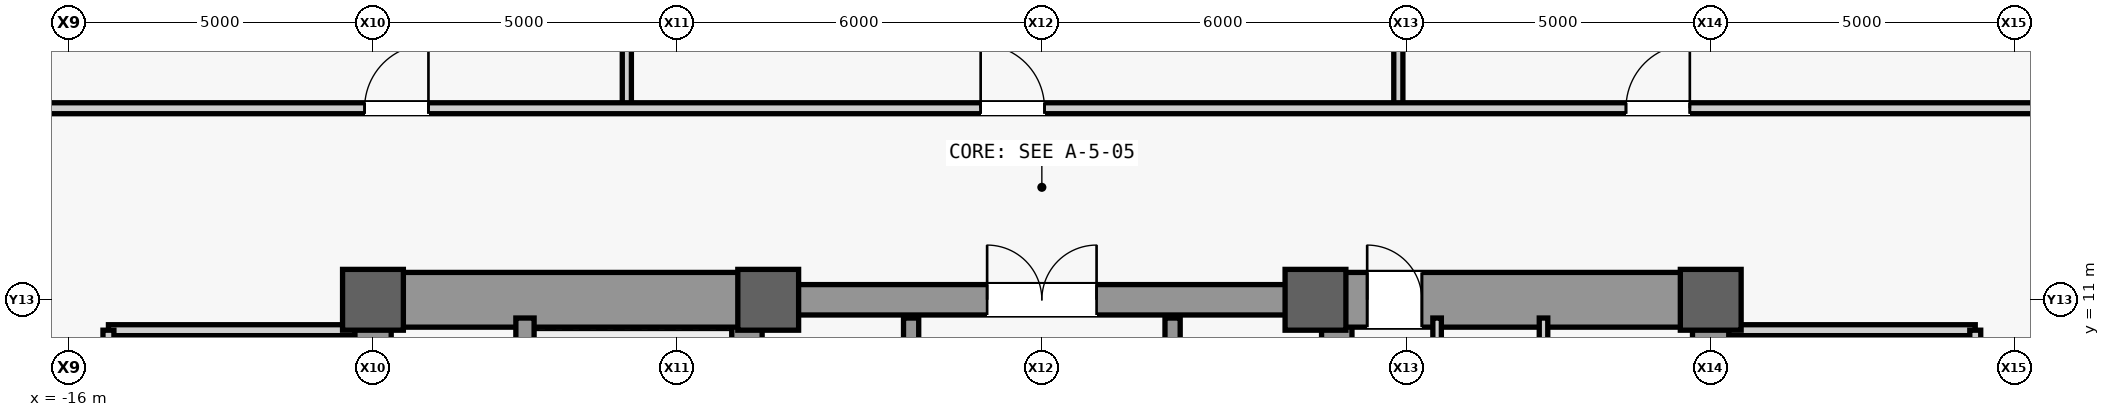
"""IFC4 building model, lengths in metres.
Left out: names, types, materials, properties, quantities, classifications, styles, units other than length and angle.
Written with IfcOpenShell. Run it as: python <this file> out.ifc"""

import sys

from ifc_helpers import new_model, si_unit, direction, frame, frame_2d, origin, origin_2d, place, context, subcontext, project, spatial, rectangle, extrude, source, transform, mapped, element, fill, save


model = new_model("IFC4")
c1 = context("Model", 3, precision=1e-05, world=origin(), true_north=direction((0.0, 1.0)))
c2 = subcontext(c1, "Body", "Model", "MODEL_VIEW")
j1 = project(units=[si_unit("LENGTHUNIT", "METRE"), si_unit("PLANEANGLEUNIT", "RADIAN")], contexts=[c1])
p1 = place(None, origin())
s1 = spatial("IfcSite", under=j1, at=p1, CompositionType="ELEMENT")
p2 = place(p1, origin())
s2 = spatial("IfcBuilding", under=s1, at=p2, CompositionType="ELEMENT")
p3 = place(p2, frame((0.0, 0.0, 70.4)))
s3 = spatial("IfcBuildingStorey", under=s2, at=p3, CompositionType="ELEMENT", Elevation=70.4)
m1 = source(origin(), c2, "Body", "SweptSolid", [
    extrude(rectangle(XDim=22.0, YDim=0.6, at=frame_2d((11.0, 0.0))), origin(), (0.0, 0.0, 1.0), 3.94),
])
p4 = place(p3, frame((-11.0, -11.0, 0.0), z_axis=(0.0, 0.0, 1.0), x_axis=(0.0, 1.0, 0.0)))
e1 = element("IfcWall", 1, at=p4, inside=s3, PredefinedType="SHEAR", context=c2, shape_type="MappedRepresentation", body=[
    mapped(m1, transform((0.0, 0.0, 0.0), scale=1.0)),
])
m2 = source(origin(), c2, "Body", "SweptSolid", [
    extrude(rectangle(XDim=1.1, YDim=2.2, at=frame_2d((0.55, 1.1))), frame((0.0, 0.31, 0.0), z_axis=(0.0, -1.0, 0.0), x_axis=(1.0, 0.0, 0.0)), (0.0, 0.0, 1.0), 0.62),
])
p5 = place(p4, frame((0.8, 0.0, 0.0)))
e2 = element("IfcOpeningElement", 2, at=p5, cuts=e1, PredefinedType="OPENING", context=c2, shape_type="MappedRepresentation", body=[
    mapped(m2, transform((0.0, 0.0, 0.0), scale=1.0)),
])
p6 = place(p4, frame((12.5, 0.0, 0.0)))
e3 = element("IfcOpeningElement", 3, at=p6, cuts=e1, PredefinedType="OPENING", context=c2, shape_type="MappedRepresentation", body=[
    mapped(m2, transform((0.0, 0.0, 0.0), scale=1.0)),
])
m3 = source(origin(), c2, "Body", "SweptSolid", [
    extrude(rectangle(XDim=0.9, YDim=2.15, at=frame_2d((0.45, 1.075))), frame((0.0, 0.31, 0.0), z_axis=(0.0, -1.0, 0.0), x_axis=(1.0, 0.0, 0.0)), (0.0, 0.0, 1.0), 0.62),
])
p7 = place(p4, frame((7.575, 0.0, 0.0)))
e4 = element("IfcOpeningElement", 4, at=p7, cuts=e1, PredefinedType="OPENING", context=c2, shape_type="MappedRepresentation", body=[
    mapped(m3, transform((0.0, 0.0, 0.0), scale=1.0)),
])
m4 = source(origin(), c2, "Body", "SweptSolid", [
    extrude(rectangle(XDim=1.3, YDim=2.3, at=frame_2d((0.65, 1.15))), frame((0.0, 0.31, 0.0), z_axis=(0.0, -1.0, 0.0), x_axis=(1.0, 0.0, 0.0)), (0.0, 0.0, 1.0), 0.62),
])
p8 = place(p4, frame((2.7, 0.0, 0.0)))
e5 = element("IfcOpeningElement", 5, at=p8, cuts=e1, PredefinedType="OPENING", context=c2, shape_type="MappedRepresentation", body=[
    mapped(m4, transform((0.0, 0.0, 0.0), scale=1.0)),
])
p9 = place(p3, frame((11.0, -11.0, 0.0), z_axis=(0.0, 0.0, 1.0), x_axis=(0.0, 1.0, 0.0)))
e6 = element("IfcWall", 6, at=p9, inside=s3, PredefinedType="SHEAR", context=c2, shape_type="MappedRepresentation", body=[
    mapped(m1, transform((0.0, 0.0, 0.0), scale=1.0)),
])
p10 = place(p9, frame((0.8, 0.0, 0.0)))
e7 = element("IfcOpeningElement", 7, at=p10, cuts=e6, PredefinedType="OPENING", context=c2, shape_type="MappedRepresentation", body=[
    mapped(m2, transform((0.0, 0.0, 0.0), scale=1.0)),
])
p11 = place(p9, frame((7.575, 0.0, 0.0)))
e8 = element("IfcOpeningElement", 8, at=p11, cuts=e6, PredefinedType="OPENING", context=c2, shape_type="MappedRepresentation", body=[
    mapped(m3, transform((0.0, 0.0, 0.0), scale=1.0)),
])
p12 = place(p9, frame((2.7, 0.0, 0.0)))
e9 = element("IfcOpeningElement", 9, at=p12, cuts=e6, PredefinedType="OPENING", context=c2, shape_type="MappedRepresentation", body=[
    mapped(m4, transform((0.0, 0.0, 0.0), scale=1.0)),
])
p13 = place(p9, frame((13.35, 0.0, 0.0)))
e10 = element("IfcOpeningElement", 10, at=p13, cuts=e6, PredefinedType="OPENING", context=c2, shape_type="MappedRepresentation", body=[
    mapped(m4, transform((0.0, 0.0, 0.0), scale=1.0)),
])
m5 = source(origin(), c2, "Body", "SweptSolid", [
    extrude(rectangle(XDim=21.4, YDim=0.5, at=frame_2d((10.7, 0.0))), origin(), (0.0, 0.0, 1.0), 3.94),
])
for number, where, z_axis, x_axis in (
    (11, (-4.85, -10.7, 0.0), (0.0, 0.0, 1.0), (0.0, 1.0, 0.0)),
    (12, (4.85, -10.7, 0.0), (0.0, 0.0, 1.0), (0.0, 1.0, 0.0)),
):
    element("IfcWall", number, at=place(p3, frame(where, z_axis=z_axis, x_axis=x_axis)), inside=s3, PredefinedType="SHEAR", context=c2, shape_type="MappedRepresentation", body=[
        mapped(m5, transform((0.0, 0.0, 0.0), scale=1.0)),
    ])
m6 = source(origin(), c2, "Body", "SweptSolid", [
    extrude(rectangle(XDim=5.85, YDim=0.9, at=frame_2d((2.925, 0.0))), origin(), (0.0, 0.0, 1.0), 3.94),
])
p14 = place(p3, frame((-10.7, 11.0, 0.0), z_axis=(0.0, 0.0, 1.0), x_axis=(1.0, 0.0, 0.0)))
e13 = element("IfcWall", 13, at=p14, inside=s3, PredefinedType="SHEAR", context=c2, shape_type="MappedRepresentation", body=[
    mapped(m6, transform((0.0, 0.0, 0.0), scale=1.0)),
])
p15 = place(p3, frame((4.85, 11.0, 0.0), z_axis=(0.0, 0.0, 1.0), x_axis=(1.0, 0.0, 0.0)))
e14 = element("IfcWall", 14, at=p15, inside=s3, PredefinedType="SHEAR", context=c2, shape_type="MappedRepresentation", body=[
    mapped(m6, transform((0.0, 0.0, 0.0), scale=1.0)),
])
m7 = source(origin(), c2, "Body", "SweptSolid", [
    extrude(rectangle(XDim=0.9, YDim=2.15, at=frame_2d((0.45, 1.075))), frame((0.0, 0.46, 0.0), z_axis=(0.0, -1.0, 0.0), x_axis=(1.0, 0.0, 0.0)), (0.0, 0.0, 1.0), 0.92),
])
p16 = place(p15, frame((0.5, 0.0, 0.0)))
e15 = element("IfcOpeningElement", 15, at=p16, cuts=e14, PredefinedType="OPENING", context=c2, shape_type="MappedRepresentation", body=[
    mapped(m7, transform((0.0, 0.0, 0.0), scale=1.0)),
])
m8 = source(origin(), c2, "Body", "SweptSolid", [
    extrude(rectangle(XDim=9.2, YDim=0.5, at=frame_2d((4.6, 0.0))), origin(), (0.0, 0.0, 1.0), 3.94),
])
p17 = place(p3, frame((-4.6, 11.0, 0.0), z_axis=(0.0, 0.0, 1.0), x_axis=(1.0, 0.0, 0.0)))
e16 = element("IfcWall", 16, at=p17, inside=s3, PredefinedType="SHEAR", context=c2, shape_type="MappedRepresentation", body=[
    mapped(m8, transform((0.0, 0.0, 0.0), scale=1.0)),
])
m9 = source(origin(), c2, "Body", "SweptSolid", [
    extrude(rectangle(XDim=1.8, YDim=2.25, at=frame_2d((0.9, 1.125))), frame((0.0, 0.26, 0.0), z_axis=(0.0, -1.0, 0.0), x_axis=(1.0, 0.0, 0.0)), (0.0, 0.0, 1.0), 0.52),
])
p18 = place(p17, frame((3.7, 0.0, 0.0)))
e17 = element("IfcOpeningElement", 17, at=p18, cuts=e16, PredefinedType="OPENING", context=c2, shape_type="MappedRepresentation", body=[
    mapped(m9, transform((0.0, 0.0, 0.0), scale=1.0)),
])
m10 = source(origin(), c2, "Body", "SweptSolid", [
    extrude(rectangle(XDim=1.0, YDim=1.0, at=origin_2d()), origin(), (0.0, 0.0, 1.0), 4.2),
])
for number, where, z_axis, x_axis in (
    (18, (-11.0, 11.0, 0.0), (0.0, 0.0, 1.0), (1.0, 0.0, 0.0)),
    (19, (-4.5, 11.0, 0.0), (0.0, 0.0, 1.0), (1.0, 0.0, 0.0)),
    (20, (4.5, 11.0, 0.0), (0.0, 0.0, 1.0), (1.0, 0.0, 0.0)),
    (21, (11.0, 11.0, 0.0), (0.0, 0.0, 1.0), (1.0, 0.0, 0.0)),
):
    element("IfcColumn", number, at=place(p3, frame(where, z_axis=z_axis, x_axis=x_axis)), inside=s3, PredefinedType="COLUMN", context=c2, shape_type="MappedRepresentation", body=[
        mapped(m10, transform((0.0, 0.0, 0.0), scale=1.0)),
    ])
m11 = source(origin(), c2, "Body", "SweptSolid", [
    extrude(rectangle(XDim=7.75, YDim=0.3, at=frame_2d((3.875, 0.0))), origin(), (0.0, 0.0, 1.0), 3.94),
])
p19 = place(p3, frame((-8.5, 2.95, 0.0), z_axis=(0.0, 0.0, 1.0), x_axis=(0.0, 1.0, 0.0)))
e22 = element("IfcWall", 22, at=p19, inside=s3, PredefinedType="SHEAR", context=c2, shape_type="MappedRepresentation", body=[
    mapped(m11, transform((0.0, 0.0, 0.0), scale=1.0)),
])
m12 = source(origin(), c2, "Body", "SweptSolid", [
    extrude(rectangle(XDim=9.4, YDim=0.14, at=frame_2d((4.7, 0.0))), origin(), (0.0, 0.0, 1.0), 3.94),
])
p20 = place(p3, frame((8.25, 1.3, 0.0), z_axis=(0.0, 0.0, 1.0), x_axis=(0.0, 1.0, 0.0)))
e23 = element("IfcWall", 23, at=p20, inside=s3, PredefinedType="PARTITIONING", context=c2, shape_type="MappedRepresentation", body=[
    mapped(m12, transform((0.0, 0.0, 0.0), scale=1.0)),
])
m13 = source(origin(), c2, "Body", "SweptSolid", [
    extrude(rectangle(XDim=5.7, YDim=0.14, at=frame_2d((2.85, 0.0))), origin(), (0.0, 0.0, 1.0), 3.94),
])
p21 = place(p3, frame((6.5, 5.0, 0.0), z_axis=(0.0, 0.0, 1.0), x_axis=(0.0, 1.0, 0.0)))
e24 = element("IfcWall", 24, at=p21, inside=s3, PredefinedType="PARTITIONING", context=c2, shape_type="MappedRepresentation", body=[
    mapped(m13, transform((0.0, 0.0, 0.0), scale=1.0)),
])
m14 = source(origin(), c2, "Body", "SweptSolid", [
    extrude(rectangle(XDim=0.9, YDim=2.15, at=frame_2d((0.45, 1.075))), frame((0.0, 0.08, 0.0), z_axis=(0.0, -1.0, 0.0), x_axis=(1.0, 0.0, 0.0)), (0.0, 0.0, 1.0), 0.16),
])
p22 = place(p21, frame((2.05, 0.0, 0.0)))
e25 = element("IfcOpeningElement", 25, at=p22, cuts=e24, PredefinedType="OPENING", context=c2, shape_type="MappedRepresentation", body=[
    mapped(m14, transform((0.0, 0.0, 0.0), scale=1.0)),
])
m15 = source(origin(), c2, "Body", "SweptSolid", [
    extrude(rectangle(XDim=4.05, YDim=0.18, at=frame_2d((2.025, 0.0))), origin(), (0.0, 0.0, 1.0), 3.94),
])
p23 = place(p3, frame((-15.35, 10.5, 0.0), z_axis=(0.0, 0.0, 1.0), x_axis=(1.0, 0.0, 0.0)))
e26 = element("IfcWall", 26, at=p23, inside=s3, PredefinedType="PARTITIONING", context=c2, shape_type="MappedRepresentation", body=[
    mapped(m15, transform((0.0, 0.0, 0.0), scale=1.0)),
])
m16 = source(origin(), c2, "Body", "SweptSolid", [
    extrude(rectangle(XDim=16.6, YDim=0.18, at=frame_2d((8.3, 0.0))), origin(), (0.0, 0.0, 1.0), 3.94),
])
p24 = place(p3, frame((-15.35, -6.1, 0.0), z_axis=(0.0, 0.0, 1.0), x_axis=(0.0, 1.0, 0.0)))
e27 = element("IfcWall", 27, at=p24, inside=s3, PredefinedType="PARTITIONING", context=c2, shape_type="MappedRepresentation", body=[
    mapped(m16, transform((0.0, 0.0, 0.0), scale=1.0)),
])
m17 = source(origin(), c2, "Body", "SweptSolid", [
    extrude(rectangle(XDim=1.8, YDim=2.25, at=frame_2d((0.9, 1.125))), frame((0.0, 0.1, 0.0), z_axis=(0.0, -1.0, 0.0), x_axis=(1.0, 0.0, 0.0)), (0.0, 0.0, 1.0), 0.2),
])
p25 = place(p24, frame((2.7, 0.0, 0.0)))
e28 = element("IfcOpeningElement", 28, at=p25, cuts=e27, PredefinedType="OPENING", context=c2, shape_type="MappedRepresentation", body=[
    mapped(m17, transform((0.0, 0.0, 0.0), scale=1.0)),
])
p26 = place(p24, frame((11.0, 0.0, 0.0)))
e29 = element("IfcOpeningElement", 29, at=p26, cuts=e27, PredefinedType="OPENING", context=c2, shape_type="MappedRepresentation", body=[
    mapped(m17, transform((0.0, 0.0, 0.0), scale=1.0)),
])
p27 = place(p3, frame((11.3, 10.5, 0.0), z_axis=(0.0, 0.0, 1.0), x_axis=(1.0, 0.0, 0.0)))
e30 = element("IfcWall", 30, at=p27, inside=s3, PredefinedType="PARTITIONING", context=c2, shape_type="MappedRepresentation", body=[
    mapped(m15, transform((0.0, 0.0, 0.0), scale=1.0)),
])
p28 = place(p3, frame((15.35, -6.1, 0.0), z_axis=(0.0, 0.0, 1.0), x_axis=(0.0, 1.0, 0.0)))
e31 = element("IfcWall", 31, at=p28, inside=s3, PredefinedType="PARTITIONING", context=c2, shape_type="MappedRepresentation", body=[
    mapped(m16, transform((0.0, 0.0, 0.0), scale=1.0)),
])
p29 = place(p28, frame((2.7, 0.0, 0.0)))
e32 = element("IfcOpeningElement", 32, at=p29, cuts=e31, PredefinedType="OPENING", context=c2, shape_type="MappedRepresentation", body=[
    mapped(m17, transform((0.0, 0.0, 0.0), scale=1.0)),
])
p30 = place(p28, frame((13.0, 0.0, 0.0)))
e33 = element("IfcOpeningElement", 33, at=p30, cuts=e31, PredefinedType="OPENING", context=c2, shape_type="MappedRepresentation", body=[
    mapped(m17, transform((0.0, 0.0, 0.0), scale=1.0)),
])
m18 = source(origin(), c2, "Body", "SweptSolid", [
    extrude(rectangle(XDim=5.4, YDim=0.25, at=frame_2d((2.7, 0.0))), origin(), (0.0, 0.0, 1.0), 3.94),
])
for number, where, z_axis, x_axis in (
    (34, (-2.15, 5.3, 0.0), (0.0, 0.0, 1.0), (0.0, 1.0, 0.0)),
    (35, (2.15, 5.3, 0.0), (0.0, 0.0, 1.0), (0.0, 1.0, 0.0)),
):
    element("IfcWall", number, at=place(p3, frame(where, z_axis=z_axis, x_axis=x_axis)), inside=s3, PredefinedType="SHEAR", context=c2, shape_type="MappedRepresentation", body=[
        mapped(m18, transform((0.0, 0.0, 0.0), scale=1.0)),
    ])
m19 = source(origin(), c2, "Body", "SweptSolid", [
    extrude(rectangle(XDim=17.85, YDim=0.15, at=frame_2d((8.925, 0.0))), origin(), (0.0, 0.0, 1.0), 3.94),
])
p31 = place(p3, frame((-6.825, 14.15, 0.0), z_axis=(0.0, 0.0, 1.0), x_axis=(0.0, 1.0, 0.0)))
e36 = element("IfcWall", 36, at=p31, inside=s3, PredefinedType="PARTITIONING", context=c2, shape_type="MappedRepresentation", body=[
    mapped(m19, transform((0.0, 0.0, 0.0), scale=1.0)),
])
m20 = source(origin(), c2, "Body", "SweptSolid", [
    extrude(rectangle(XDim=17.85, YDim=0.15, at=frame_2d((8.925, 0.0))), origin(), (0.0, 0.0, 1.0), 3.085),
])
p32 = place(p3, frame((5.863, 14.15, 0.0), z_axis=(0.0, 0.0, 1.0), x_axis=(0.0, 1.0, 0.0)))
e37 = element("IfcWall", 37, at=p32, inside=s3, PredefinedType="PARTITIONING", context=c2, shape_type="MappedRepresentation", body=[
    mapped(m20, transform((0.0, 0.0, 0.0), scale=1.0)),
])
m21 = source(origin(), c2, "Body", "SweptSolid", [
    extrude(rectangle(XDim=36.25, YDim=0.18, at=frame_2d((18.125, 0.0))), origin(), (0.0, 0.0, 1.0), 3.94),
])
p33 = place(p3, frame((-17.7, 14.15, 0.0), z_axis=(0.0, 0.0, 1.0), x_axis=(1.0, 0.0, 0.0)))
e38 = element("IfcWall", 38, at=p33, inside=s3, PredefinedType="PARTITIONING", context=c2, shape_type="MappedRepresentation", body=[
    mapped(m21, transform((0.0, 0.0, 0.0), scale=1.0)),
])
m22 = source(origin(), c2, "Body", "SweptSolid", [
    extrude(rectangle(XDim=1.05, YDim=2.2, at=frame_2d((0.525, 1.1))), frame((0.0, 0.1, 0.0), z_axis=(0.0, -1.0, 0.0), x_axis=(1.0, 0.0, 0.0)), (0.0, 0.0, 1.0), 0.2),
])
p34 = place(p33, frame((6.562, 0.0, 0.0)))
e39 = element("IfcOpeningElement", 39, at=p34, cuts=e38, PredefinedType="OPENING", context=c2, shape_type="MappedRepresentation", body=[
    mapped(m22, transform((0.0, 0.0, 0.0), scale=1.0)),
])
p35 = place(p33, frame((16.694, 0.0, 0.0)))
e40 = element("IfcOpeningElement", 40, at=p35, cuts=e38, PredefinedType="OPENING", context=c2, shape_type="MappedRepresentation", body=[
    mapped(m22, transform((0.0, 0.0, 0.0), scale=1.0)),
])
p36 = place(p33, frame((27.306, 0.0, 0.0)))
e41 = element("IfcOpeningElement", 41, at=p36, cuts=e38, PredefinedType="OPENING", context=c2, shape_type="MappedRepresentation", body=[
    mapped(m22, transform((0.0, 0.0, 0.0), scale=1.0)),
])
m23 = source(origin(), c2, "Body", "SweptSolid", [
    extrude(rectangle(XDim=0.9, YDim=2.15, at=frame_2d((0.45, 1.075))), frame((0.0, 0.025, 0.0), z_axis=(0.0, -1.0, 0.0), x_axis=(1.0, 0.0, 0.0)), (0.0, 0.0, 1.0), 0.05),
])
p37 = place(p16, origin())
e42 = element("IfcDoor", 42, at=p37, inside=s3, OperationType="SINGLE_SWING_LEFT", PredefinedType="DOOR", context=c2, shape_type="MappedRepresentation", body=[
    mapped(m23, transform((0.0, 0.0, 0.0), scale=1.0)),
])
fill(e15, e42)
m24 = source(origin(), c2, "Body", "SweptSolid", [
    extrude(rectangle(XDim=1.8, YDim=2.25, at=frame_2d((0.9, 1.125))), frame((0.0, 0.025, 0.0), z_axis=(0.0, -1.0, 0.0), x_axis=(1.0, 0.0, 0.0)), (0.0, 0.0, 1.0), 0.05),
])
p38 = place(p18, origin())
e43 = element("IfcDoor", 43, at=p38, inside=s3, OperationType="SINGLE_SWING_RIGHT", PredefinedType="DOOR", context=c2, shape_type="MappedRepresentation", body=[
    mapped(m24, transform((0.0, 0.0, 0.0), scale=1.0)),
])
fill(e17, e43)
m25 = source(origin(), c2, "Body", "SweptSolid", [
    extrude(rectangle(XDim=1.05, YDim=2.2, at=frame_2d((0.525, 1.1))), frame((0.0, 0.025, 0.0), z_axis=(0.0, -1.0, 0.0), x_axis=(1.0, 0.0, 0.0)), (0.0, 0.0, 1.0), 0.05),
])
p39 = place(p34, origin())
e44 = element("IfcDoor", 44, at=p39, inside=s3, OperationType="SINGLE_SWING_RIGHT", PredefinedType="DOOR", context=c2, shape_type="MappedRepresentation", body=[
    mapped(m25, transform((0.0, 0.0, 0.0), scale=1.0)),
])
fill(e39, e44)
p40 = place(p35, origin())
e45 = element("IfcDoor", 45, at=p40, inside=s3, OperationType="SINGLE_SWING_LEFT", PredefinedType="DOOR", context=c2, shape_type="MappedRepresentation", body=[
    mapped(m25, transform((0.0, 0.0, 0.0), scale=1.0)),
])
fill(e40, e45)
p41 = place(p36, origin())
e46 = element("IfcDoor", 46, at=p41, inside=s3, OperationType="SINGLE_SWING_RIGHT", PredefinedType="DOOR", context=c2, shape_type="MappedRepresentation", body=[
    mapped(m25, transform((0.0, 0.0, 0.0), scale=1.0)),
])
fill(e41, e46)
save(model, sys.argv[1])
